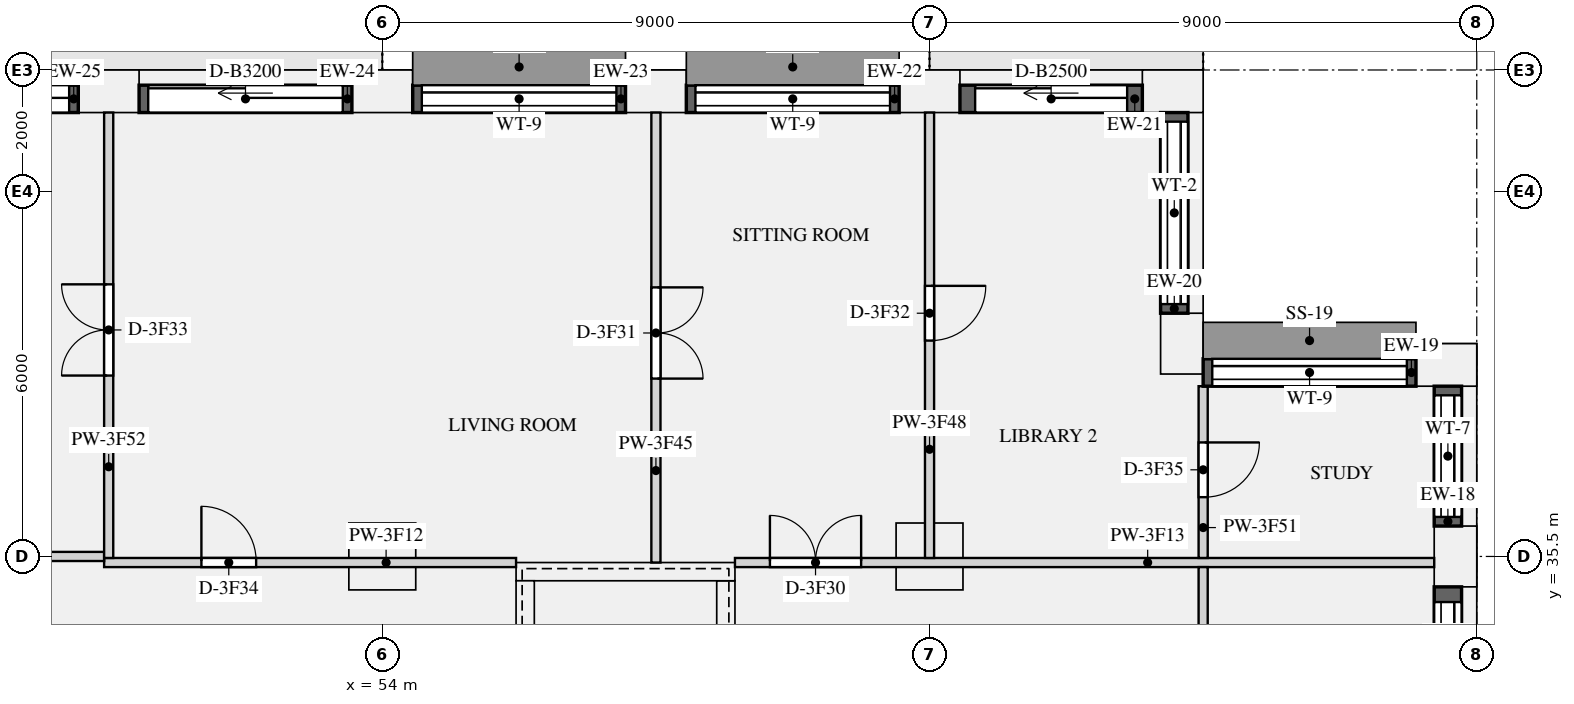
"""IFC4 building model, lengths in metres.
Left out: names, types, materials, properties, quantities, classifications, styles, units other than length and angle.
Written with IfcOpenShell. Run it as: python <this file> out.ifc"""

import sys

from ifc_helpers import new_model, si_unit, direction, frame, frame_2d, origin, origin_2d, place, context, subcontext, project, spatial, rectangle, extrude, element, fill, save


model = new_model("IFC4")
c1 = context("Model", 3, precision=1e-05, world=origin(), true_north=direction((0.0, 1.0)))
c2 = subcontext(c1, "Body", "Model", "MODEL_VIEW")
j1 = project(units=[si_unit("LENGTHUNIT", "METRE"), si_unit("PLANEANGLEUNIT", "RADIAN")], contexts=[c1])
p1 = place(None, origin())
s1 = spatial("IfcSite", under=j1, at=p1, CompositionType="ELEMENT")
p2 = place(p1, origin())
s2 = spatial("IfcBuilding", under=s1, at=p2, CompositionType="ELEMENT")
p3 = place(p2, frame((0.0, 0.0, 179.1)))
s3 = spatial("IfcBuildingStorey", under=s2, at=p3, CompositionType="ELEMENT", Elevation=179.1)
for number, where, z_axis, x_axis in (
    (1, (71.65, 35.5, 0.0), (0.0, 0.0, 1.0), (0.0, 1.0, 0.0)),
    (2, (71.5, 38.65, 0.0), (0.0, 0.0, 1.0), (-1.0, 0.0, 0.0)),
    (3, (67.15, 39.0, 0.0), (0.0, 0.0, 1.0), (0.0, 1.0, 0.0)),
    (4, (67.0, 43.15, 0.0), (0.0, 0.0, 1.0), (-1.0, 0.0, 0.0)),
    (5, (63.0, 43.15, 0.0), (0.0, 0.0, 1.0), (-1.0, 0.0, 0.0)),
    (6, (58.5, 43.15, 0.0), (0.0, 0.0, 1.0), (-1.0, 0.0, 0.0)),
    (7, (54.0, 43.15, 0.0), (0.0, 0.0, 1.0), (-1.0, 0.0, 0.0)),
    (8, (49.5, 43.15, 0.0), (0.0, 0.0, 1.0), (-1.0, 0.0, 0.0)),
):
    element("IfcColumn", number, at=place(p3, frame(where, z_axis=z_axis, x_axis=x_axis)), inside=s3, PredefinedType="USERDEFINED", context=c2, shape_type="SweptSolid", body=[
        extrude(rectangle(XDim=1.0, YDim=0.7, at=origin_2d()), origin(), (0.0, 0.0, 1.0), 3.15),
    ])
for number, where, z_axis, x_axis in (
    (9, (54.0, 35.5, 0.0), (0.0, 0.0, 1.0), (1.0, 0.0, 0.0)),
    (10, (63.0, 35.5, 0.0), (0.0, 0.0, 1.0), (1.0, 0.0, 0.0)),
):
    element("IfcColumn", number, at=place(p3, frame(where, z_axis=z_axis, x_axis=x_axis)), inside=s3, PredefinedType="COLUMN", context=c2, shape_type="SweptSolid", body=[
        extrude(rectangle(XDim=1.1, YDim=1.1, at=origin_2d()), origin(), (0.0, 0.0, 1.0), 3.15),
    ])
p4 = place(p3, frame((56.2, 35.25, 0.0), z_axis=(0.0, 0.0, 1.0), x_axis=(1.0, 0.0, 0.0)))
e11 = element("IfcWall", 11, at=p4, inside=s3, PredefinedType="SHEAR", context=c2, shape_type="SweptSolid", body=[
    extrude(rectangle(XDim=3.6, YDim=0.3, at=frame_2d((1.8, 0.0))), origin(), (0.0, 0.0, 1.0), 3.15),
])
for number, where, z_axis, x_axis in (
    (12, (56.35, 27.3, 0.0), (0.0, 0.0, 1.0), (0.0, 1.0, 0.0)),
    (13, (59.65, 27.3, 0.0), (0.0, 0.0, 1.0), (0.0, 1.0, 0.0)),
):
    element("IfcWall", number, at=place(p3, frame(where, z_axis=z_axis, x_axis=x_axis)), inside=s3, PredefinedType="SHEAR", context=c2, shape_type="SweptSolid", body=[
        extrude(rectangle(XDim=7.8, YDim=0.3, at=frame_2d((3.9, 0.0))), origin(), (0.0, 0.0, 1.0), 3.15),
    ])
p5 = place(p3, frame((71.525, 32.5, 0.9), z_axis=(0.0, 0.0, 1.0), x_axis=(0.0, 1.0, 0.0)))
e14 = element("IfcWall", 14, at=p5, inside=s3, PredefinedType="SOLIDWALL", context=c2, shape_type="SweptSolid", body=[
    extrude(rectangle(XDim=2.5, YDim=0.45, at=frame_2d((1.25, 0.0))), origin(), (0.0, 0.0, 1.0), 1.93),
])
p6 = place(p5, frame((0.25, 0.0, 0.15)))
e15 = element("IfcOpeningElement", 15, at=p6, cuts=e14, PredefinedType="OPENING", context=c2, shape_type="SweptSolid", body=[
    extrude(rectangle(XDim=2.0, YDim=1.5, at=frame_2d((1.0, 0.75))), frame((0.0, 0.235, 0.0), z_axis=(0.0, -1.0, 0.0), x_axis=(1.0, 0.0, 0.0)), (0.0, 0.0, 1.0), 0.47),
])
p7 = place(p3, frame((71.525, 36.0, 0.9), z_axis=(0.0, 0.0, 1.0), x_axis=(0.0, 1.0, 0.0)))
e16 = element("IfcWall", 16, at=p7, inside=s3, PredefinedType="SOLIDWALL", context=c2, shape_type="SweptSolid", body=[
    extrude(rectangle(XDim=2.3, YDim=0.45, at=frame_2d((1.15, 0.0))), origin(), (0.0, 0.0, 1.0), 1.93),
])
p8 = place(p7, frame((0.15, 0.0, 0.15)))
e17 = element("IfcOpeningElement", 17, at=p8, cuts=e16, PredefinedType="OPENING", context=c2, shape_type="SweptSolid", body=[
    extrude(rectangle(XDim=2.0, YDim=1.5, at=frame_2d((1.0, 0.75))), frame((0.0, 0.235, 0.0), z_axis=(0.0, -1.0, 0.0), x_axis=(1.0, 0.0, 0.0)), (0.0, 0.0, 1.0), 0.47),
])
p9 = place(p3, frame((71.0, 38.525, 0.9), z_axis=(0.0, 0.0, 1.0), x_axis=(-1.0, 0.0, 0.0)))
e18 = element("IfcWall", 18, at=p9, inside=s3, PredefinedType="SOLIDWALL", context=c2, shape_type="SweptSolid", body=[
    extrude(rectangle(XDim=3.5, YDim=0.45, at=frame_2d((1.75, 0.0))), origin(), (0.0, 0.0, 1.0), 1.93),
])
p10 = place(p9, frame((0.15, 0.0, 0.15)))
e19 = element("IfcOpeningElement", 19, at=p10, cuts=e18, PredefinedType="OPENING", context=c2, shape_type="SweptSolid", body=[
    extrude(rectangle(XDim=3.2, YDim=1.5, at=frame_2d((1.6, 0.75))), frame((0.0, 0.235, 0.0), z_axis=(0.0, -1.0, 0.0), x_axis=(1.0, 0.0, 0.0)), (0.0, 0.0, 1.0), 0.47),
])
p11 = place(p3, frame((67.025, 39.5, 0.9), z_axis=(0.0, 0.0, 1.0), x_axis=(0.0, 1.0, 0.0)))
e20 = element("IfcWall", 20, at=p11, inside=s3, PredefinedType="SOLIDWALL", context=c2, shape_type="SweptSolid", body=[
    extrude(rectangle(XDim=3.3, YDim=0.45, at=frame_2d((1.65, 0.0))), origin(), (0.0, 0.0, 1.0), 1.93),
])
p12 = place(p11, frame((0.15, 0.0, 0.15)))
e21 = element("IfcOpeningElement", 21, at=p12, cuts=e20, PredefinedType="OPENING", context=c2, shape_type="SweptSolid", body=[
    extrude(rectangle(XDim=3.0, YDim=1.5, at=frame_2d((1.5, 0.75))), frame((0.0, 0.235, 0.0), z_axis=(0.0, -1.0, 0.0), x_axis=(1.0, 0.0, 0.0)), (0.0, 0.0, 1.0), 0.47),
])
p13 = place(p3, frame((66.5, 43.025, 0.0), z_axis=(0.0, 0.0, 1.0), x_axis=(-1.0, 0.0, 0.0)))
e22 = element("IfcWall", 22, at=p13, inside=s3, PredefinedType="SOLIDWALL", context=c2, shape_type="SweptSolid", body=[
    extrude(rectangle(XDim=3.0, YDim=0.45, at=frame_2d((1.5, 0.0))), origin(), (0.0, 0.0, 1.0), 2.83),
])
p14 = place(p13, frame((0.25, 0.0, 0.0)))
e23 = element("IfcOpeningElement", 23, at=p14, cuts=e22, PredefinedType="OPENING", context=c2, shape_type="SweptSolid", body=[
    extrude(rectangle(XDim=2.5, YDim=2.3, at=frame_2d((1.25, 1.15))), frame((0.0, 0.235, 0.0), z_axis=(0.0, -1.0, 0.0), x_axis=(1.0, 0.0, 0.0)), (0.0, 0.0, 1.0), 0.47),
])
p15 = place(p3, frame((62.5, 43.025, 0.9), z_axis=(0.0, 0.0, 1.0), x_axis=(-1.0, 0.0, 0.0)))
e24 = element("IfcWall", 24, at=p15, inside=s3, PredefinedType="SOLIDWALL", context=c2, shape_type="SweptSolid", body=[
    extrude(rectangle(XDim=3.5, YDim=0.45, at=frame_2d((1.75, 0.0))), origin(), (0.0, 0.0, 1.0), 1.93),
])
p16 = place(p15, frame((0.15, 0.0, 0.15)))
e25 = element("IfcOpeningElement", 25, at=p16, cuts=e24, PredefinedType="OPENING", context=c2, shape_type="SweptSolid", body=[
    extrude(rectangle(XDim=3.2, YDim=1.5, at=frame_2d((1.6, 0.75))), frame((0.0, 0.235, 0.0), z_axis=(0.0, -1.0, 0.0), x_axis=(1.0, 0.0, 0.0)), (0.0, 0.0, 1.0), 0.47),
])
p17 = place(p3, frame((58.0, 43.025, 0.9), z_axis=(0.0, 0.0, 1.0), x_axis=(-1.0, 0.0, 0.0)))
e26 = element("IfcWall", 26, at=p17, inside=s3, PredefinedType="SOLIDWALL", context=c2, shape_type="SweptSolid", body=[
    extrude(rectangle(XDim=3.5, YDim=0.45, at=frame_2d((1.75, 0.0))), origin(), (0.0, 0.0, 1.0), 1.93),
])
p18 = place(p17, frame((0.15, 0.0, 0.15)))
e27 = element("IfcOpeningElement", 27, at=p18, cuts=e26, PredefinedType="OPENING", context=c2, shape_type="SweptSolid", body=[
    extrude(rectangle(XDim=3.2, YDim=1.5, at=frame_2d((1.6, 0.75))), frame((0.0, 0.235, 0.0), z_axis=(0.0, -1.0, 0.0), x_axis=(1.0, 0.0, 0.0)), (0.0, 0.0, 1.0), 0.47),
])
p19 = place(p3, frame((53.5, 43.025, 0.0), z_axis=(0.0, 0.0, 1.0), x_axis=(-1.0, 0.0, 0.0)))
e28 = element("IfcWall", 28, at=p19, inside=s3, PredefinedType="SOLIDWALL", context=c2, shape_type="SweptSolid", body=[
    extrude(rectangle(XDim=3.5, YDim=0.45, at=frame_2d((1.75, 0.0))), origin(), (0.0, 0.0, 1.0), 2.83),
])
p20 = place(p19, frame((0.15, 0.0, 0.0)))
e29 = element("IfcOpeningElement", 29, at=p20, cuts=e28, PredefinedType="OPENING", context=c2, shape_type="SweptSolid", body=[
    extrude(rectangle(XDim=3.2, YDim=2.3, at=frame_2d((1.6, 1.15))), frame((0.0, 0.235, 0.0), z_axis=(0.0, -1.0, 0.0), x_axis=(1.0, 0.0, 0.0)), (0.0, 0.0, 1.0), 0.47),
])
p21 = place(p3, frame((49.0, 43.025, 0.0), z_axis=(0.0, 0.0, 1.0), x_axis=(-1.0, 0.0, 0.0)))
e30 = element("IfcWall", 30, at=p21, inside=s3, PredefinedType="SOLIDWALL", context=c2, shape_type="SweptSolid", body=[
    extrude(rectangle(XDim=3.5, YDim=0.45, at=frame_2d((1.75, 0.0))), origin(), (0.0, 0.0, 1.0), 2.83),
])
p22 = place(p21, frame((0.15, 0.0, 0.0)))
e31 = element("IfcOpeningElement", 31, at=p22, cuts=e30, PredefinedType="OPENING", context=c2, shape_type="SweptSolid", body=[
    extrude(rectangle(XDim=3.2, YDim=2.3, at=frame_2d((1.6, 1.15))), frame((0.0, 0.235, 0.0), z_axis=(0.0, -1.0, 0.0), x_axis=(1.0, 0.0, 0.0)), (0.0, 0.0, 1.0), 0.47),
])
p23 = place(p3, frame((49.425, 35.4, 0.0), z_axis=(0.0, 0.0, 1.0), x_axis=(1.0, 0.0, 0.0)))
e32 = element("IfcWall", 32, at=p23, inside=s3, PredefinedType="PARTITIONING", context=c2, shape_type="SweptSolid", body=[
    extrude(rectangle(XDim=6.775, YDim=0.15, at=frame_2d((3.387, 0.0))), origin(), (0.0, 0.0, 1.0), 2.83),
])
p24 = place(p23, frame((1.6, 0.0, 0.0)))
e33 = element("IfcOpeningElement", 33, at=p24, cuts=e32, PredefinedType="OPENING", context=c2, shape_type="SweptSolid", body=[
    extrude(rectangle(XDim=0.9, YDim=2.1, at=frame_2d((0.45, 1.05))), frame((0.0, 0.085, 0.0), z_axis=(0.0, -1.0, 0.0), x_axis=(1.0, 0.0, 0.0)), (0.0, 0.0, 1.0), 0.17),
])
p25 = place(p3, frame((59.8, 35.4, 0.0), z_axis=(0.0, 0.0, 1.0), x_axis=(1.0, 0.0, 0.0)))
e34 = element("IfcWall", 34, at=p25, inside=s3, PredefinedType="PARTITIONING", context=c2, shape_type="SweptSolid", body=[
    extrude(rectangle(XDim=11.5, YDim=0.15, at=frame_2d((5.75, 0.0))), origin(), (0.0, 0.0, 1.0), 2.83),
])
p26 = place(p25, frame((0.575, 0.0, 0.0)))
e35 = element("IfcOpeningElement", 35, at=p26, cuts=e34, PredefinedType="OPENING", context=c2, shape_type="SweptSolid", body=[
    extrude(rectangle(XDim=1.5, YDim=2.1, at=frame_2d((0.75, 1.05))), frame((0.0, 0.085, 0.0), z_axis=(0.0, -1.0, 0.0), x_axis=(1.0, 0.0, 0.0)), (0.0, 0.0, 1.0), 0.17),
])
p27 = place(p3, frame((45.0, 35.5, 0.0), z_axis=(0.0, 0.0, 1.0), x_axis=(1.0, 0.0, 0.0)))
e36 = element("IfcWall", 36, at=p27, inside=s3, PredefinedType="PARTITIONING", context=c2, shape_type="SweptSolid", body=[
    extrude(rectangle(XDim=4.425, YDim=0.15, at=frame_2d((2.212, 0.0))), origin(), (0.0, 0.0, 1.0), 2.83),
])
p28 = place(p3, frame((58.5, 35.4, 0.0), z_axis=(0.0, 0.0, 1.0), x_axis=(0.0, 1.0, 0.0)))
e37 = element("IfcWall", 37, at=p28, inside=s3, PredefinedType="PARTITIONING", context=c2, shape_type="SweptSolid", body=[
    extrude(rectangle(XDim=7.4, YDim=0.15, at=frame_2d((3.7, 0.0))), origin(), (0.0, 0.0, 1.0), 2.83),
])
p29 = place(p28, frame((3.025, 0.0, 0.0)))
e38 = element("IfcOpeningElement", 38, at=p29, cuts=e37, PredefinedType="OPENING", context=c2, shape_type="SweptSolid", body=[
    extrude(rectangle(XDim=1.5, YDim=2.1, at=frame_2d((0.75, 1.05))), frame((0.0, 0.085, 0.0), z_axis=(0.0, -1.0, 0.0), x_axis=(1.0, 0.0, 0.0)), (0.0, 0.0, 1.0), 0.17),
])
p30 = place(p3, frame((63.0, 35.475, 0.0), z_axis=(0.0, 0.0, 1.0), x_axis=(0.0, 1.0, 0.0)))
e39 = element("IfcWall", 39, at=p30, inside=s3, PredefinedType="PARTITIONING", context=c2, shape_type="SweptSolid", body=[
    extrude(rectangle(XDim=7.325, YDim=0.15, at=frame_2d((3.663, 0.0))), origin(), (0.0, 0.0, 1.0), 2.83),
])
p31 = place(p30, frame((3.575, 0.0, 0.0)))
e40 = element("IfcOpeningElement", 40, at=p31, cuts=e39, PredefinedType="OPENING", context=c2, shape_type="SweptSolid", body=[
    extrude(rectangle(XDim=0.9, YDim=2.1, at=frame_2d((0.45, 1.05))), frame((0.0, 0.085, 0.0), z_axis=(0.0, -1.0, 0.0), x_axis=(1.0, 0.0, 0.0)), (0.0, 0.0, 1.0), 0.17),
])
p32 = place(p3, frame((67.5, 24.575, 0.0), z_axis=(0.0, 0.0, 1.0), x_axis=(0.0, 1.0, 0.0)))
e41 = element("IfcWall", 41, at=p32, inside=s3, PredefinedType="PARTITIONING", context=c2, shape_type="SweptSolid", body=[
    extrude(rectangle(XDim=10.75, YDim=0.15, at=frame_2d((5.375, 0.0))), origin(), (0.0, 0.0, 1.0), 2.83),
])
p33 = place(p32, frame((6.875, 0.0, 0.0)))
e42 = element("IfcOpeningElement", 42, at=p33, cuts=e41, PredefinedType="OPENING", context=c2, shape_type="SweptSolid", body=[
    extrude(rectangle(XDim=1.5, YDim=2.1, at=frame_2d((0.75, 1.05))), frame((0.0, 0.085, 0.0), z_axis=(0.0, -1.0, 0.0), x_axis=(1.0, 0.0, 0.0)), (0.0, 0.0, 1.0), 0.17),
])
p34 = place(p3, frame((67.5, 35.475, 0.0), z_axis=(0.0, 0.0, 1.0), x_axis=(0.0, 1.0, 0.0)))
e43 = element("IfcWall", 43, at=p34, inside=s3, PredefinedType="PARTITIONING", context=c2, shape_type="SweptSolid", body=[
    extrude(rectangle(XDim=2.825, YDim=0.15, at=frame_2d((1.413, 0.0))), origin(), (0.0, 0.0, 1.0), 2.83),
])
p35 = place(p34, frame((1.0, 0.0, 0.0)))
e44 = element("IfcOpeningElement", 44, at=p35, cuts=e43, PredefinedType="OPENING", context=c2, shape_type="SweptSolid", body=[
    extrude(rectangle(XDim=0.9, YDim=2.1, at=frame_2d((0.45, 1.05))), frame((0.0, 0.085, 0.0), z_axis=(0.0, -1.0, 0.0), x_axis=(1.0, 0.0, 0.0)), (0.0, 0.0, 1.0), 0.17),
])
p36 = place(p3, frame((49.5, 35.475, 0.0), z_axis=(0.0, 0.0, 1.0), x_axis=(0.0, 1.0, 0.0)))
e45 = element("IfcWall", 45, at=p36, inside=s3, PredefinedType="PARTITIONING", context=c2, shape_type="SweptSolid", body=[
    extrude(rectangle(XDim=7.325, YDim=0.15, at=frame_2d((3.663, 0.0))), origin(), (0.0, 0.0, 1.0), 2.83),
])
p37 = place(p36, frame((3.0, 0.0, 0.0)))
e46 = element("IfcOpeningElement", 46, at=p37, cuts=e45, PredefinedType="OPENING", context=c2, shape_type="SweptSolid", body=[
    extrude(rectangle(XDim=1.5, YDim=2.1, at=frame_2d((0.75, 1.05))), frame((0.0, 0.085, 0.0), z_axis=(0.0, -1.0, 0.0), x_axis=(1.0, 0.0, 0.0)), (0.0, 0.0, 1.0), 0.17),
])
p38 = place(p6, origin())
e47 = element("IfcWindow", 47, at=p38, inside=s3, PartitioningType="SINGLE_PANEL", PredefinedType="WINDOW", context=c2, shape_type="SweptSolid", body=[
    extrude(rectangle(XDim=2.0, YDim=1.5, at=frame_2d((1.0, 0.75))), frame((0.0, -0.065, 0.0), z_axis=(0.0, -1.0, 0.0), x_axis=(1.0, 0.0, 0.0)), (0.0, 0.0, 1.0), 0.06),
])
fill(e15, e47)
p39 = place(p8, origin())
e48 = element("IfcWindow", 48, at=p39, inside=s3, PartitioningType="SINGLE_PANEL", PredefinedType="WINDOW", context=c2, shape_type="SweptSolid", body=[
    extrude(rectangle(XDim=2.0, YDim=1.5, at=frame_2d((1.0, 0.75))), frame((0.0, -0.065, 0.0), z_axis=(0.0, -1.0, 0.0), x_axis=(1.0, 0.0, 0.0)), (0.0, 0.0, 1.0), 0.06),
])
fill(e17, e48)
p40 = place(p10, origin())
e49 = element("IfcWindow", 49, at=p40, inside=s3, PartitioningType="SINGLE_PANEL", PredefinedType="WINDOW", context=c2, shape_type="SweptSolid", body=[
    extrude(rectangle(XDim=3.2, YDim=1.5, at=frame_2d((1.6, 0.75))), frame((0.0, -0.065, 0.0), z_axis=(0.0, -1.0, 0.0), x_axis=(1.0, 0.0, 0.0)), (0.0, 0.0, 1.0), 0.06),
])
fill(e19, e49)
p41 = place(p12, origin())
e50 = element("IfcWindow", 50, at=p41, inside=s3, PartitioningType="SINGLE_PANEL", PredefinedType="WINDOW", context=c2, shape_type="SweptSolid", body=[
    extrude(rectangle(XDim=3.0, YDim=1.5, at=frame_2d((1.5, 0.75))), frame((0.0, -0.065, 0.0), z_axis=(0.0, -1.0, 0.0), x_axis=(1.0, 0.0, 0.0)), (0.0, 0.0, 1.0), 0.06),
])
fill(e21, e50)
p42 = place(p14, origin())
e51 = element("IfcDoor", 51, at=p42, inside=s3, OperationType="SLIDING_TO_LEFT", PredefinedType="DOOR", context=c2, shape_type="SweptSolid", body=[
    extrude(rectangle(XDim=2.5, YDim=2.3, at=frame_2d((1.25, 1.15))), frame((0.0, -0.07, 0.0), z_axis=(0.0, -1.0, 0.0), x_axis=(1.0, 0.0, 0.0)), (0.0, 0.0, 1.0), 0.05),
])
fill(e23, e51)
p43 = place(p16, origin())
e52 = element("IfcWindow", 52, at=p43, inside=s3, PartitioningType="SINGLE_PANEL", PredefinedType="WINDOW", context=c2, shape_type="SweptSolid", body=[
    extrude(rectangle(XDim=3.2, YDim=1.5, at=frame_2d((1.6, 0.75))), frame((0.0, -0.065, 0.0), z_axis=(0.0, -1.0, 0.0), x_axis=(1.0, 0.0, 0.0)), (0.0, 0.0, 1.0), 0.06),
])
fill(e25, e52)
p44 = place(p18, origin())
e53 = element("IfcWindow", 53, at=p44, inside=s3, PartitioningType="SINGLE_PANEL", PredefinedType="WINDOW", context=c2, shape_type="SweptSolid", body=[
    extrude(rectangle(XDim=3.2, YDim=1.5, at=frame_2d((1.6, 0.75))), frame((0.0, -0.065, 0.0), z_axis=(0.0, -1.0, 0.0), x_axis=(1.0, 0.0, 0.0)), (0.0, 0.0, 1.0), 0.06),
])
fill(e27, e53)
p45 = place(p20, origin())
e54 = element("IfcDoor", 54, at=p45, inside=s3, OperationType="SLIDING_TO_LEFT", PredefinedType="DOOR", context=c2, shape_type="SweptSolid", body=[
    extrude(rectangle(XDim=3.2, YDim=2.3, at=frame_2d((1.6, 1.15))), frame((0.0, -0.07, 0.0), z_axis=(0.0, -1.0, 0.0), x_axis=(1.0, 0.0, 0.0)), (0.0, 0.0, 1.0), 0.05),
])
fill(e29, e54)
p46 = place(p22, origin())
e55 = element("IfcDoor", 55, at=p46, inside=s3, OperationType="SLIDING_TO_LEFT", PredefinedType="DOOR", context=c2, shape_type="SweptSolid", body=[
    extrude(rectangle(XDim=3.2, YDim=2.3, at=frame_2d((1.6, 1.15))), frame((0.0, -0.07, 0.0), z_axis=(0.0, -1.0, 0.0), x_axis=(1.0, 0.0, 0.0)), (0.0, 0.0, 1.0), 0.05),
])
fill(e31, e55)
p47 = place(p26, origin())
e56 = element("IfcDoor", 56, at=p47, inside=s3, OperationType="DOUBLE_DOOR_SINGLE_SWING", PredefinedType="DOOR", context=c2, shape_type="SweptSolid", body=[
    extrude(rectangle(XDim=1.5, YDim=2.1, at=frame_2d((0.75, 1.05))), frame((0.0, 0.025, 0.0), z_axis=(0.0, -1.0, 0.0), x_axis=(1.0, 0.0, 0.0)), (0.0, 0.0, 1.0), 0.05),
])
fill(e35, e56)
p48 = place(p29, frame((1.5, 0.0, 0.0), z_axis=(0.0, 0.0, 1.0), x_axis=(-1.0, 0.0, 0.0)))
e57 = element("IfcDoor", 57, at=p48, inside=s3, OperationType="DOUBLE_DOOR_SINGLE_SWING", PredefinedType="DOOR", context=c2, shape_type="SweptSolid", body=[
    extrude(rectangle(XDim=1.5, YDim=2.1, at=frame_2d((0.75, 1.05))), frame((0.0, 0.025, 0.0), z_axis=(0.0, -1.0, 0.0), x_axis=(1.0, 0.0, 0.0)), (0.0, 0.0, 1.0), 0.05),
])
fill(e38, e57)
p49 = place(p31, frame((0.9, 0.0, 0.0), z_axis=(0.0, 0.0, 1.0), x_axis=(-1.0, 0.0, 0.0)))
e58 = element("IfcDoor", 58, at=p49, inside=s3, OperationType="SINGLE_SWING_LEFT", PredefinedType="DOOR", context=c2, shape_type="SweptSolid", body=[
    extrude(rectangle(XDim=0.9, YDim=2.1, at=frame_2d((0.45, 1.05))), frame((0.0, 0.025, 0.0), z_axis=(0.0, -1.0, 0.0), x_axis=(1.0, 0.0, 0.0)), (0.0, 0.0, 1.0), 0.05),
])
fill(e40, e58)
p50 = place(p37, origin())
e59 = element("IfcDoor", 59, at=p50, inside=s3, OperationType="DOUBLE_DOOR_SINGLE_SWING", PredefinedType="DOOR", context=c2, shape_type="SweptSolid", body=[
    extrude(rectangle(XDim=1.5, YDim=2.1, at=frame_2d((0.75, 1.05))), frame((0.0, 0.025, 0.0), z_axis=(0.0, -1.0, 0.0), x_axis=(1.0, 0.0, 0.0)), (0.0, 0.0, 1.0), 0.05),
])
fill(e46, e59)
p51 = place(p24, origin())
e60 = element("IfcDoor", 60, at=p51, inside=s3, OperationType="SINGLE_SWING_LEFT", PredefinedType="DOOR", context=c2, shape_type="SweptSolid", body=[
    extrude(rectangle(XDim=0.9, YDim=2.1, at=frame_2d((0.45, 1.05))), frame((0.0, 0.025, 0.0), z_axis=(0.0, -1.0, 0.0), x_axis=(1.0, 0.0, 0.0)), (0.0, 0.0, 1.0), 0.05),
])
fill(e33, e60)
p52 = place(p35, frame((0.9, 0.0, 0.0), z_axis=(0.0, 0.0, 1.0), x_axis=(-1.0, 0.0, 0.0)))
e61 = element("IfcDoor", 61, at=p52, inside=s3, OperationType="SINGLE_SWING_LEFT", PredefinedType="DOOR", context=c2, shape_type="SweptSolid", body=[
    extrude(rectangle(XDim=0.9, YDim=2.1, at=frame_2d((0.45, 1.05))), frame((0.0, 0.025, 0.0), z_axis=(0.0, -1.0, 0.0), x_axis=(1.0, 0.0, 0.0)), (0.0, 0.0, 1.0), 0.05),
])
fill(e44, e61)
save(model, sys.argv[1])
